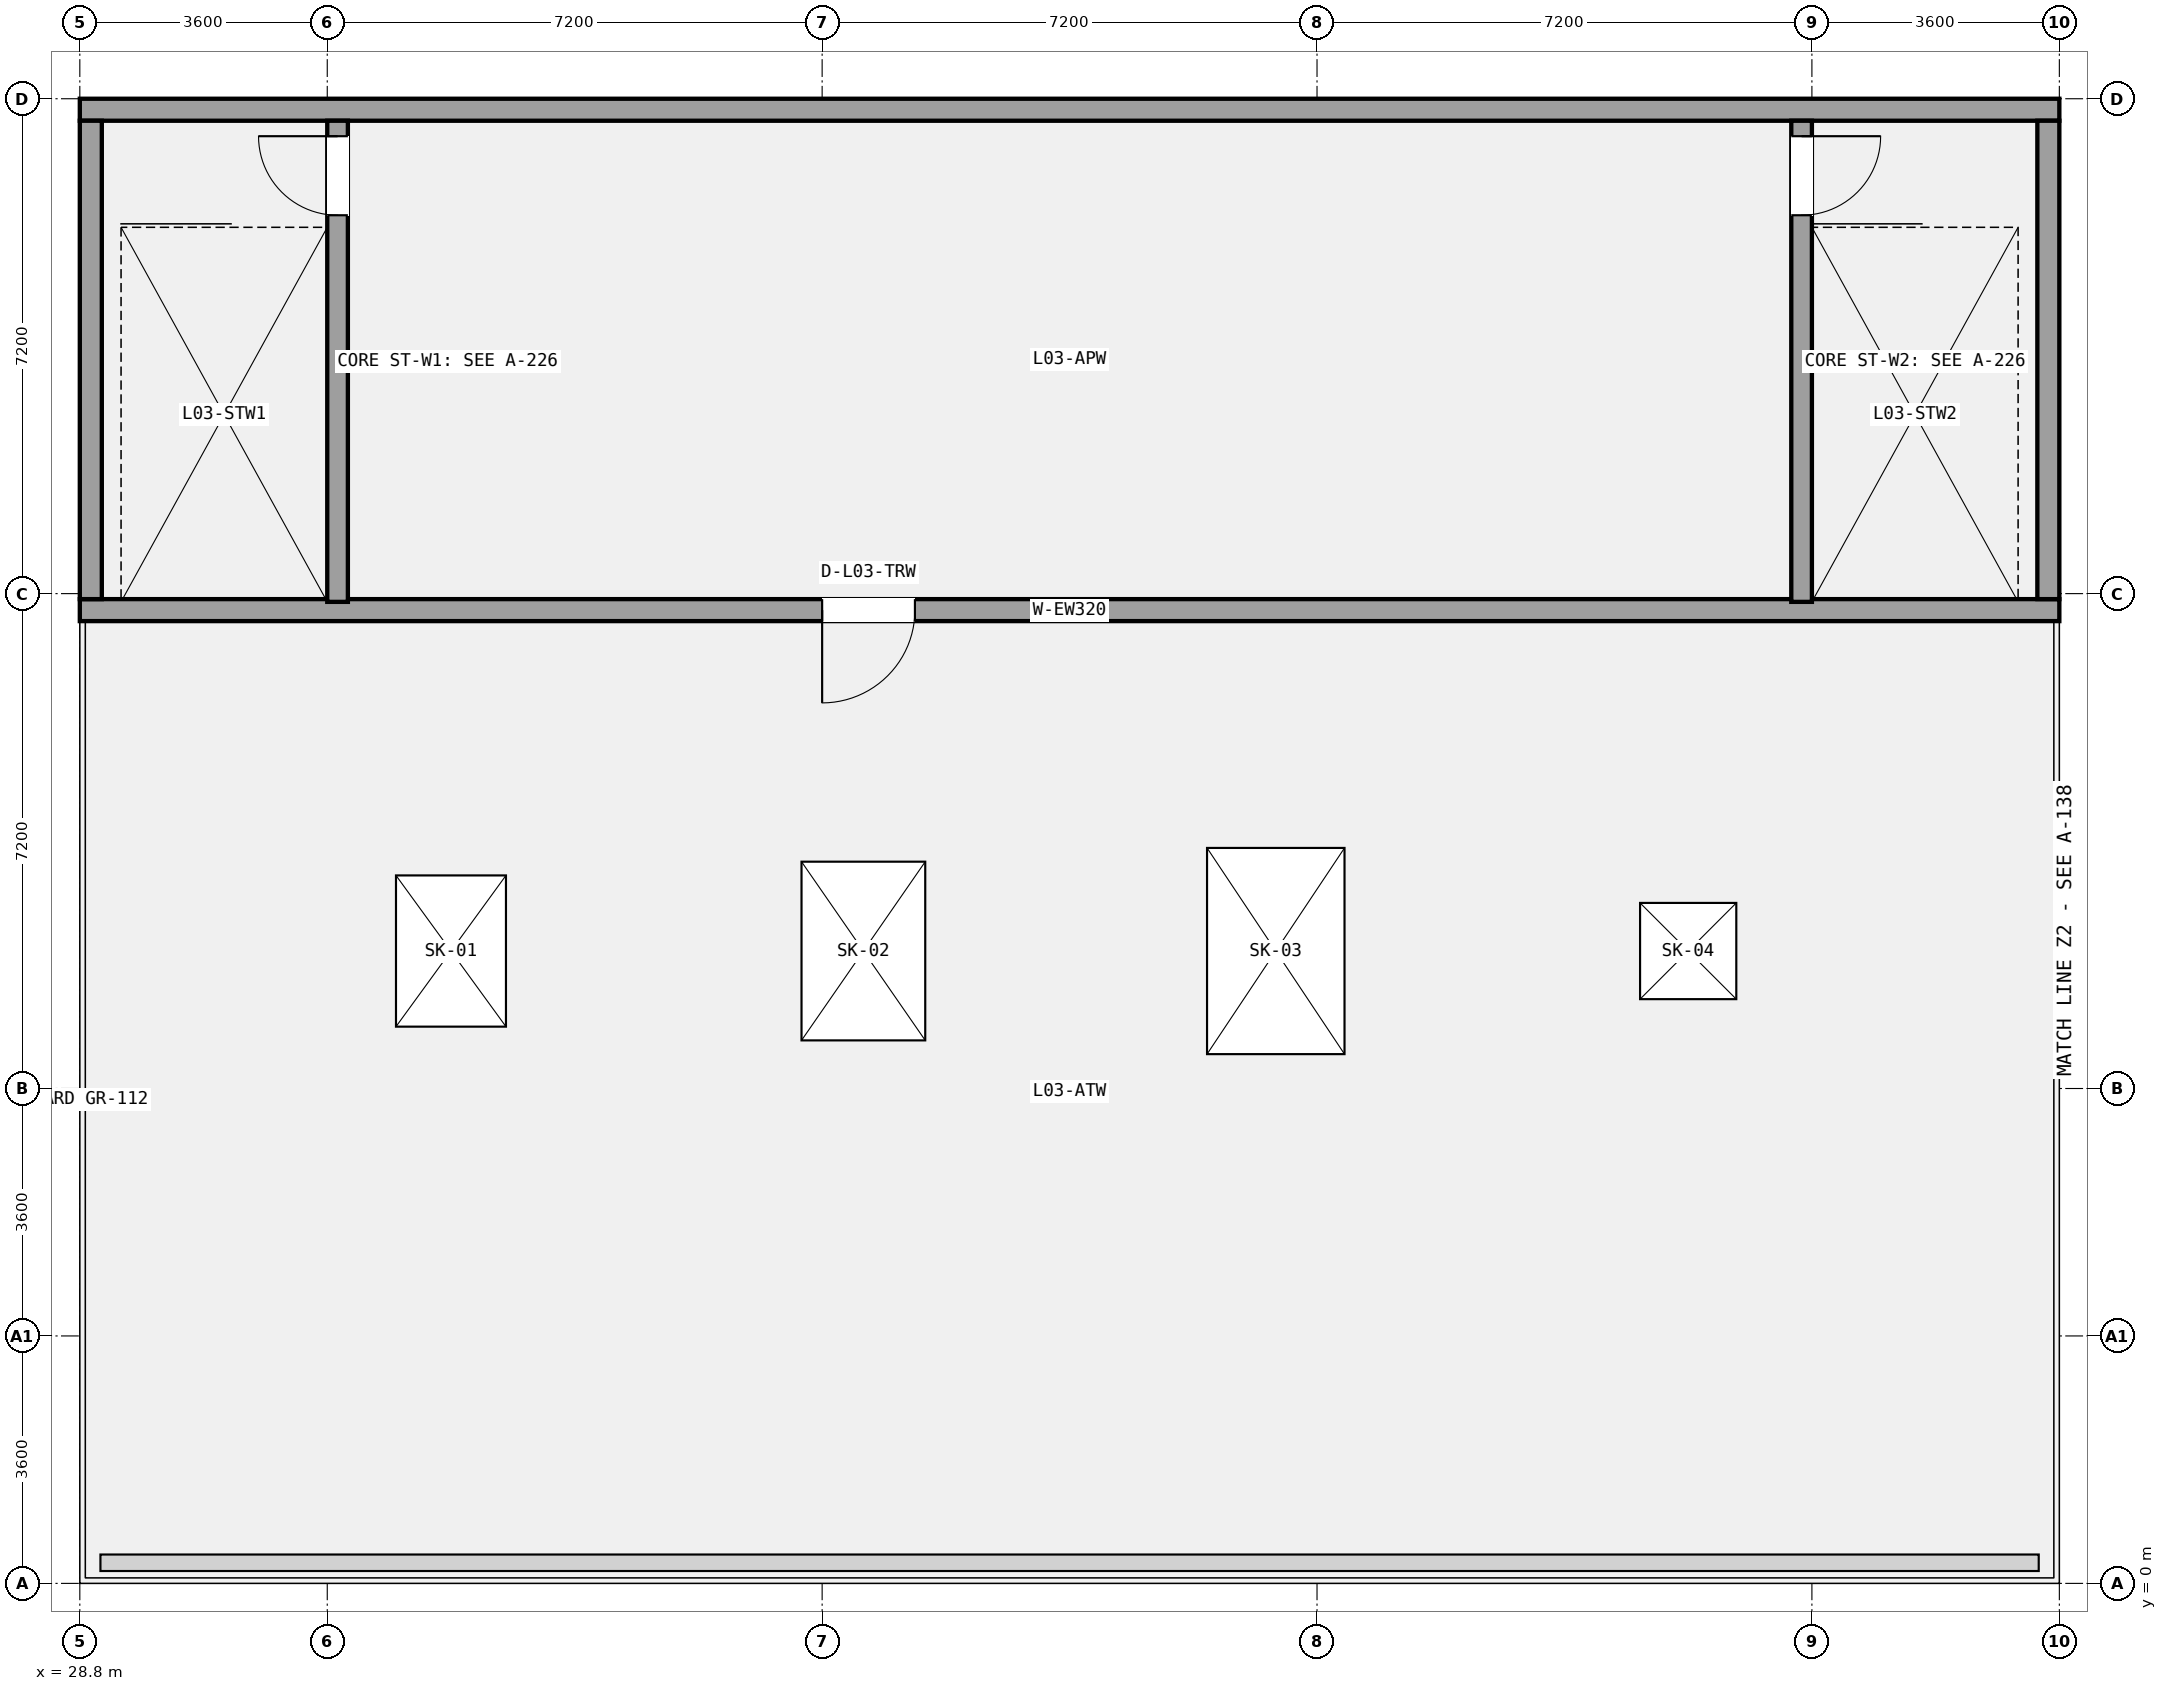
"""IFC4 building model, lengths in metres.
Left out: names, types, materials, properties, quantities, classifications, styles, units other than length and angle.
Written with IfcOpenShell. Run it as: python <this file> out.ifc"""

import sys

from ifc_helpers import new_model, si_unit, direction, frame, frame_2d, origin, origin_2d, place, context, subcontext, project, spatial, rectangle, extrude, element, fill, save


model = new_model("IFC4")
c1 = context("Model", 3, precision=1e-05, world=origin(), true_north=direction((0.0, 1.0)))
c2 = subcontext(c1, "Body", "Model", "MODEL_VIEW")
j1 = project(units=[si_unit("LENGTHUNIT", "METRE"), si_unit("PLANEANGLEUNIT", "RADIAN")], contexts=[c1])
p1 = place(None, origin())
s1 = spatial("IfcSite", under=j1, at=p1, CompositionType="ELEMENT")
p2 = place(p1, origin())
s2 = spatial("IfcBuilding", under=s1, at=p2, CompositionType="ELEMENT")
p3 = place(p2, frame((0.0, 0.0, 12.075)))
s3 = spatial("IfcBuildingStorey", under=s2, at=p3, CompositionType="ELEMENT", Elevation=12.075)
p4 = place(p3, frame((28.8, 14.16, 0.0), z_axis=(0.0, 0.0, 1.0), x_axis=(1.0, 0.0, 0.0)))
e1 = element("IfcWall", 1, at=p4, inside=s3, PredefinedType="SOLIDWALL", context=c2, shape_type="SweptSolid", body=[
    extrude(rectangle(XDim=28.8, YDim=0.32, at=frame_2d((14.4, 0.0))), origin(), (0.0, 0.0, 1.0), 3.15),
])
p5 = place(p4, frame((10.8, 0.0, 0.0)))
e2 = element("IfcOpeningElement", 2, at=p5, cuts=e1, PredefinedType="OPENING", context=c2, shape_type="SweptSolid", body=[
    extrude(rectangle(XDim=1.35, YDim=2.2, at=frame_2d((0.675, 1.1))), frame((0.0, 0.17, 0.0), z_axis=(0.0, -1.0, 0.0), x_axis=(1.0, 0.0, 0.0)), (0.0, 0.0, 1.0), 0.34),
])
p6 = place(p3, frame((28.8, 21.44, 0.0), z_axis=(0.0, 0.0, 1.0), x_axis=(1.0, 0.0, 0.0)))
e3 = element("IfcWall", 3, at=p6, inside=s3, PredefinedType="SOLIDWALL", context=c2, shape_type="SweptSolid", body=[
    extrude(rectangle(XDim=28.8, YDim=0.32, at=frame_2d((14.4, 0.0))), origin(), (0.0, 0.0, 1.0), 3.15),
])
for number, where, z_axis, x_axis in (
    (4, (28.96, 14.32, 0.0), (0.0, 0.0, 1.0), (0.0, 1.0, 0.0)),
    (5, (57.44, 14.32, 0.0), (0.0, 0.0, 1.0), (0.0, 1.0, 0.0)),
):
    element("IfcWall", number, at=place(p3, frame(where, z_axis=z_axis, x_axis=x_axis)), inside=s3, PredefinedType="SOLIDWALL", context=c2, shape_type="SweptSolid", body=[
        extrude(rectangle(XDim=6.96, YDim=0.32, at=frame_2d((3.48, 0.0))), origin(), (0.0, 0.0, 1.0), 3.15),
    ])
p7 = place(p3, frame((29.1, 0.3, 0.0), z_axis=(0.0, 0.0, 1.0), x_axis=(1.0, 0.0, 0.0)))
e6 = element("IfcWall", 6, at=p7, inside=s3, PredefinedType="PARAPET", context=c2, shape_type="SweptSolid", body=[
    extrude(rectangle(XDim=28.2, YDim=0.24, at=frame_2d((14.1, 0.0))), origin(), (0.0, 0.0, 1.0), 0.22),
])
p8 = place(p3, frame((32.55, 14.28, 0.0), z_axis=(0.0, 0.0, 1.0), x_axis=(0.0, 1.0, 0.0)))
e7 = element("IfcWall", 7, at=p8, inside=s3, PredefinedType="SHEAR", context=c2, shape_type="SweptSolid", body=[
    extrude(rectangle(XDim=7.0, YDim=0.3, at=frame_2d((3.5, 0.0))), origin(), (0.0, 0.0, 1.0), 3.15),
])
p9 = place(p8, frame((5.625, 0.0, 0.0)))
e8 = element("IfcOpeningElement", 8, at=p9, cuts=e7, PredefinedType="OPENING", context=c2, shape_type="SweptSolid", body=[
    extrude(rectangle(XDim=1.15, YDim=2.12, at=frame_2d((0.575, 1.06))), frame((0.0, 0.16, 0.0), z_axis=(0.0, -1.0, 0.0), x_axis=(1.0, 0.0, 0.0)), (0.0, 0.0, 1.0), 0.32),
])
p10 = place(p3, frame((53.85, 14.28, 0.0), z_axis=(0.0, 0.0, 1.0), x_axis=(0.0, 1.0, 0.0)))
e9 = element("IfcWall", 9, at=p10, inside=s3, PredefinedType="SHEAR", context=c2, shape_type="SweptSolid", body=[
    extrude(rectangle(XDim=7.0, YDim=0.3, at=frame_2d((3.5, 0.0))), origin(), (0.0, 0.0, 1.0), 3.15),
])
p11 = place(p10, frame((5.625, 0.0, 0.0)))
e10 = element("IfcOpeningElement", 10, at=p11, cuts=e9, PredefinedType="OPENING", context=c2, shape_type="SweptSolid", body=[
    extrude(rectangle(XDim=1.15, YDim=2.12, at=frame_2d((0.575, 1.06))), frame((0.0, 0.16, 0.0), z_axis=(0.0, -1.0, 0.0), x_axis=(1.0, 0.0, 0.0)), (0.0, 0.0, 1.0), 0.32),
])
p12 = place(p3, frame((0.0, 0.0, -0.24)))
p13 = place(p12, frame((34.2, 9.2, 0.0)))
p14 = place(p13, frame((0.0, 0.0, 0.095)))
e11 = element("IfcWindow", 11, at=p14, inside=s3, PartitioningType="SINGLE_PANEL", PredefinedType="SKYLIGHT", context=c2, shape_type="SweptSolid", body=[
    extrude(rectangle(XDim=1.6, YDim=2.2, at=origin_2d()), origin(), (0.0, 0.0, 1.0), 0.05),
])
p15 = place(p12, frame((40.2, 9.2, 0.0)))
p16 = place(p15, frame((0.0, 0.0, 0.095)))
e12 = element("IfcWindow", 12, at=p16, inside=s3, PartitioningType="SINGLE_PANEL", PredefinedType="SKYLIGHT", context=c2, shape_type="SweptSolid", body=[
    extrude(rectangle(XDim=1.8, YDim=2.6, at=origin_2d()), origin(), (0.0, 0.0, 1.0), 0.05),
])
p17 = place(p12, frame((46.2, 9.2, 0.0)))
p18 = place(p17, frame((0.0, 0.0, 0.095)))
e13 = element("IfcWindow", 13, at=p18, inside=s3, PartitioningType="SINGLE_PANEL", PredefinedType="SKYLIGHT", context=c2, shape_type="SweptSolid", body=[
    extrude(rectangle(XDim=2.0, YDim=3.0, at=origin_2d()), origin(), (0.0, 0.0, 1.0), 0.05),
])
p19 = place(p12, frame((52.2, 9.2, 0.0)))
p20 = place(p19, frame((0.0, 0.0, 0.095)))
e14 = element("IfcWindow", 14, at=p20, inside=s3, PartitioningType="SINGLE_PANEL", PredefinedType="SKYLIGHT", context=c2, shape_type="SweptSolid", body=[
    extrude(rectangle(XDim=1.4, YDim=1.4, at=origin_2d()), origin(), (0.0, 0.0, 1.0), 0.05),
])
p21 = place(p5, frame((1.35, 0.0, 0.0), z_axis=(0.0, 0.0, 1.0), x_axis=(-1.0, 0.0, 0.0)))
e15 = element("IfcDoor", 15, at=p21, inside=s3, OperationType="SINGLE_SWING_LEFT", PredefinedType="DOOR", context=c2, shape_type="SweptSolid", body=[
    extrude(rectangle(XDim=1.35, YDim=2.2, at=frame_2d((0.675, 1.1))), frame((0.0, 0.025, 0.0), z_axis=(0.0, -1.0, 0.0), x_axis=(1.0, 0.0, 0.0)), (0.0, 0.0, 1.0), 0.05),
])
fill(e2, e15)
p22 = place(p9, origin())
e16 = element("IfcDoor", 16, at=p22, inside=s3, OperationType="SINGLE_SWING_RIGHT", PredefinedType="DOOR", context=c2, shape_type="SweptSolid", body=[
    extrude(rectangle(XDim=1.15, YDim=2.12, at=frame_2d((0.575, 1.06))), frame((0.0, 0.025, 0.0), z_axis=(0.0, -1.0, 0.0), x_axis=(1.0, 0.0, 0.0)), (0.0, 0.0, 1.0), 0.05),
])
fill(e8, e16)
p23 = place(p11, frame((1.15, 0.0, 0.0), z_axis=(0.0, 0.0, 1.0), x_axis=(-1.0, 0.0, 0.0)))
e17 = element("IfcDoor", 17, at=p23, inside=s3, OperationType="SINGLE_SWING_RIGHT", PredefinedType="DOOR", context=c2, shape_type="SweptSolid", body=[
    extrude(rectangle(XDim=1.15, YDim=2.12, at=frame_2d((0.575, 1.06))), frame((0.0, 0.025, 0.0), z_axis=(0.0, -1.0, 0.0), x_axis=(1.0, 0.0, 0.0)), (0.0, 0.0, 1.0), 0.05),
])
fill(e10, e17)
save(model, sys.argv[1])
